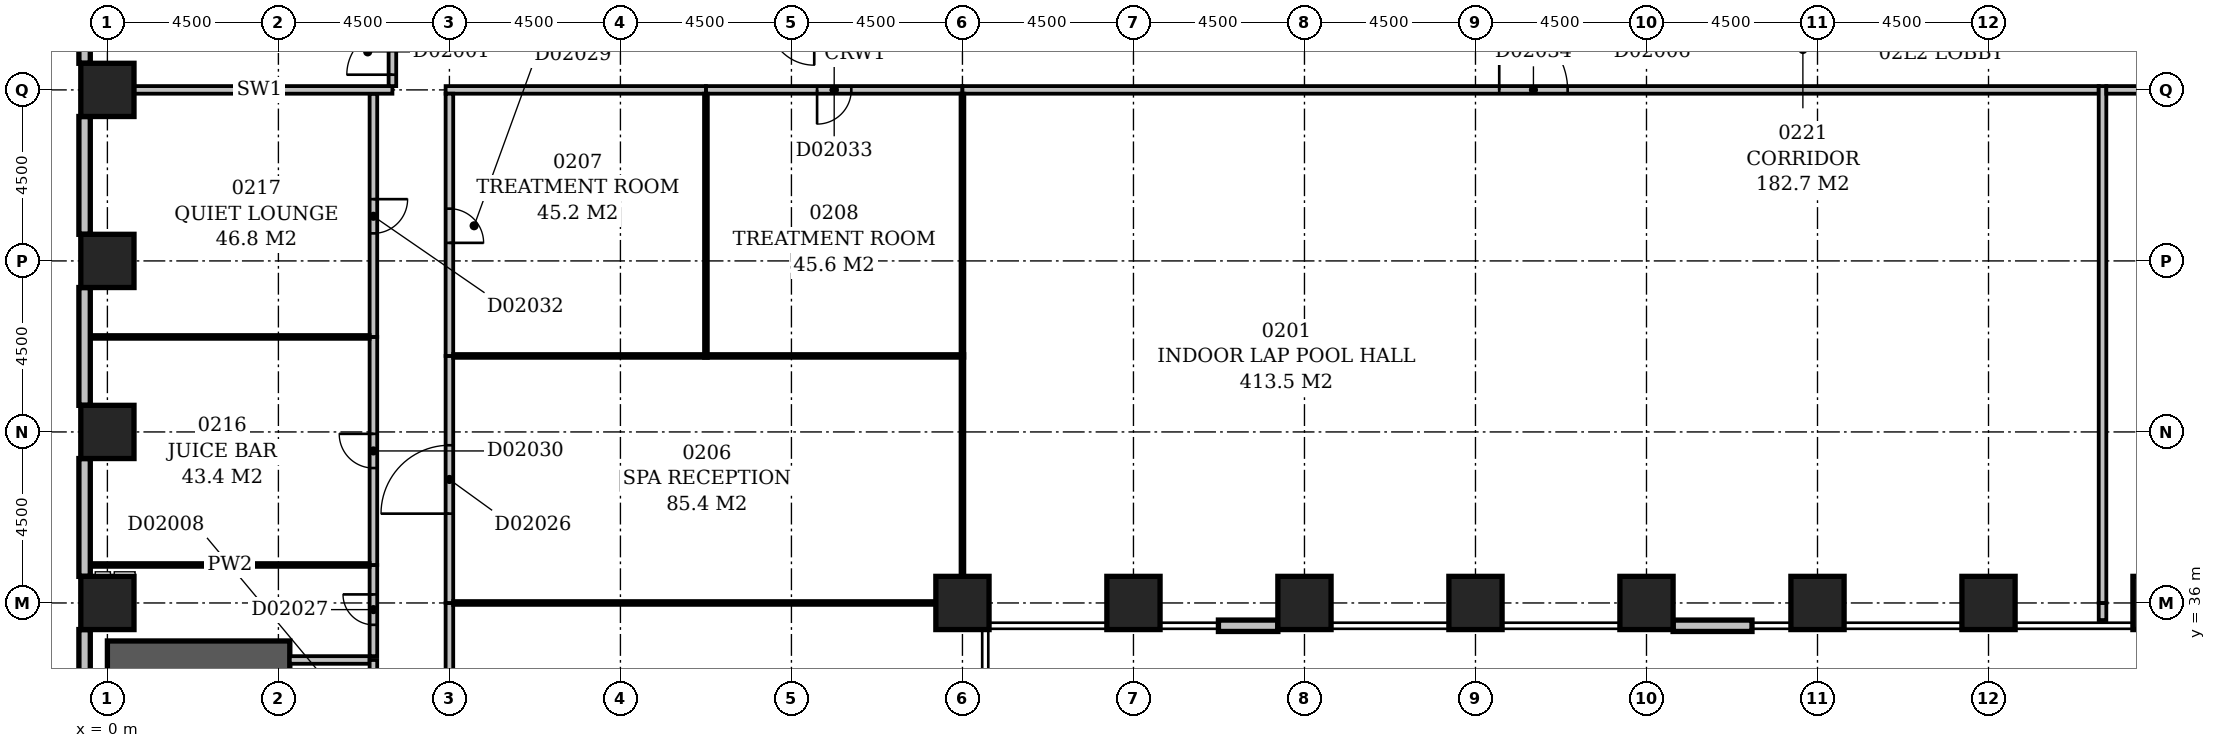
"""IFC4 building model, lengths in metres.
Left out: names, types, materials, properties, quantities, classifications, styles, units other than length and angle.
Written with IfcOpenShell. Run it as: python <this file> out.ifc"""

import sys

from ifc_helpers import new_model, si_unit, direction, frame, frame_2d, origin, origin_2d, place, context, subcontext, project, spatial, rectangle, extrude, element, fill, save


model = new_model("IFC4")
c1 = context("Model", 3, precision=1e-05, world=origin(), true_north=direction((0.0, 1.0)))
c2 = subcontext(c1, "Body", "Model", "MODEL_VIEW")
j1 = project(units=[si_unit("LENGTHUNIT", "METRE"), si_unit("PLANEANGLEUNIT", "RADIAN")], contexts=[c1])
p1 = place(None, origin())
s1 = spatial("IfcSite", under=j1, at=p1, CompositionType="ELEMENT")
p2 = place(p1, origin())
s2 = spatial("IfcBuilding", under=s1, at=p2, CompositionType="ELEMENT")
p3 = place(p2, frame((0.0, 0.0, 14.0)))
s3 = spatial("IfcBuildingStorey", under=s2, at=p3, CompositionType="ELEMENT", Elevation=14.0)
p4 = place(p3, frame((0.0, 34.5, -0.4), z_axis=(0.0, 0.0, 1.0), x_axis=(1.0, 0.0, 0.0)))
e1 = element("IfcWall", 1, at=p4, inside=s3, PredefinedType="SHEAR", context=c2, shape_type="SweptSolid", body=[
    extrude(rectangle(XDim=4.8, YDim=1.0, at=frame_2d((2.4, 0.0))), origin(), (0.0, 0.0, 1.0), 5.0),
])
for number, where, z_axis, x_axis in (
    (2, (0.0, 36.0, -0.4), (0.0, 0.0, 1.0), (1.0, 0.0, 0.0)),
    (3, (22.5, 36.0, -0.4), (0.0, 0.0, 1.0), (1.0, 0.0, 0.0)),
    (4, (27.0, 36.0, -0.4), (0.0, 0.0, 1.0), (1.0, 0.0, 0.0)),
    (5, (31.5, 36.0, -0.4), (0.0, 0.0, 1.0), (1.0, 0.0, 0.0)),
    (6, (36.0, 36.0, -0.4), (0.0, 0.0, 1.0), (1.0, 0.0, 0.0)),
    (7, (40.5, 36.0, -0.4), (0.0, 0.0, 1.0), (1.0, 0.0, 0.0)),
    (8, (45.0, 36.0, -0.4), (0.0, 0.0, 1.0), (1.0, 0.0, 0.0)),
    (9, (49.5, 36.0, -0.4), (0.0, 0.0, 1.0), (1.0, 0.0, 0.0)),
    (10, (54.0, 36.0, -0.4), (0.0, 0.0, 1.0), (1.0, 0.0, 0.0)),
    (11, (0.0, 40.5, -0.4), (0.0, 0.0, 1.0), (1.0, 0.0, 0.0)),
    (12, (0.0, 45.0, -0.4), (0.0, 0.0, 1.0), (1.0, 0.0, 0.0)),
    (13, (0.0, 49.5, -0.4), (0.0, 0.0, 1.0), (1.0, 0.0, 0.0)),
):
    element("IfcColumn", number, at=place(p3, frame(where, z_axis=z_axis, x_axis=x_axis)), inside=s3, PredefinedType="COLUMN", context=c2, shape_type="SweptSolid", body=[
        extrude(rectangle(XDim=1.4, YDim=1.4, at=origin_2d()), origin(), (0.0, 0.0, 1.0), 5.0),
    ])
p5 = place(p3, frame((29.236, 35.4, 0.0), z_axis=(0.0, 0.0, 1.0), x_axis=(1.0, 0.0, 0.0)))
e14 = element("IfcWall", 14, at=p5, inside=s3, PredefinedType="STANDARD", context=c2, shape_type="SweptSolid", body=[
    extrude(rectangle(XDim=1.564, YDim=0.3, at=frame_2d((0.782, 0.0))), origin(), (0.0, 0.0, 1.0), 3.9),
])
p6 = place(p3, frame((41.2, 35.4, 0.0), z_axis=(0.0, 0.0, 1.0), x_axis=(1.0, 0.0, 0.0)))
e15 = element("IfcWall", 15, at=p6, inside=s3, PredefinedType="STANDARD", context=c2, shape_type="SweptSolid", body=[
    extrude(rectangle(XDim=2.076, YDim=0.3, at=frame_2d((1.038, 0.0))), origin(), (0.0, 0.0, 1.0), 3.9),
])
for number, where, z_axis, x_axis in (
    (16, (-0.6, 53.3, 0.0), (0.0, 0.0, 1.0), (0.0, -1.0, 0.0)),
    (17, (-0.6, 48.8, 0.0), (0.0, 0.0, 1.0), (0.0, -1.0, 0.0)),
    (18, (-0.6, 44.3, 0.0), (0.0, 0.0, 1.0), (0.0, -1.0, 0.0)),
    (19, (-0.6, 39.8, 0.0), (0.0, 0.0, 1.0), (0.0, -1.0, 0.0)),
    (20, (-0.6, 35.3, 0.0), (0.0, 0.0, 1.0), (0.0, -1.0, 0.0)),
):
    element("IfcWall", number, at=place(p3, frame(where, z_axis=z_axis, x_axis=x_axis)), inside=s3, PredefinedType="STANDARD", context=c2, shape_type="SweptSolid", body=[
        extrude(rectangle(XDim=3.1, YDim=0.3, at=frame_2d((1.55, 0.0))), origin(), (0.0, 0.0, 1.0), 3.9),
    ])
p7 = place(p3, frame((7.0, 32.1, 0.0), z_axis=(0.0, 0.0, 1.0), x_axis=(0.0, 1.0, 0.0)))
e21 = element("IfcWall", 21, at=p7, inside=s3, PredefinedType="PARTITIONING", context=c2, shape_type="SweptSolid", body=[
    extrude(rectangle(XDim=2.4, YDim=0.2, at=frame_2d((1.2, 0.0))), origin(), (0.0, 0.0, 1.0), 4.6),
])
p8 = place(p7, frame((0.55, 0.0, 0.0)))
e22 = element("IfcOpeningElement", 22, at=p8, cuts=e21, PredefinedType="OPENING", context=c2, shape_type="SweptSolid", body=[
    extrude(rectangle(XDim=1.2, YDim=2.1, at=frame_2d((0.6, 1.05))), frame((0.0, 0.112, 0.0), z_axis=(0.0, -1.0, 0.0), x_axis=(1.0, 0.0, 0.0)), (0.0, 0.0, 1.0), 0.224),
])
p9 = place(p3, frame((4.8, 34.5, 0.0), z_axis=(0.0, 0.0, 1.0), x_axis=(1.0, 0.0, 0.0)))
e23 = element("IfcWall", 23, at=p9, inside=s3, PredefinedType="PARTITIONING", context=c2, shape_type="SweptSolid", body=[
    extrude(rectangle(XDim=2.1, YDim=0.2, at=frame_2d((1.05, 0.0))), origin(), (0.0, 0.0, 1.0), 4.6),
])
p10 = place(p3, frame((0.5, 49.5, 0.0), z_axis=(0.0, 0.0, 1.0), x_axis=(1.0, 0.0, 0.0)))
e24 = element("IfcWall", 24, at=p10, inside=s3, PredefinedType="PARTITIONING", context=c2, shape_type="SweptSolid", body=[
    extrude(rectangle(XDim=7.0, YDim=0.2, at=frame_2d((3.5, 0.0))), origin(), (0.0, 0.0, 1.0), 4.6),
])
p11 = place(p3, frame((7.5, 49.6, 0.0), z_axis=(0.0, 0.0, 1.0), x_axis=(0.0, 1.0, 0.0)))
e25 = element("IfcWall", 25, at=p11, inside=s3, PredefinedType="PARTITIONING", context=c2, shape_type="SweptSolid", body=[
    extrude(rectangle(XDim=3.9, YDim=0.2, at=frame_2d((1.95, 0.0))), origin(), (0.0, 0.0, 1.0), 4.6),
])
p12 = place(p11, frame((0.3, 0.0, 0.0)))
e26 = element("IfcOpeningElement", 26, at=p12, cuts=e25, PredefinedType="OPENING", context=c2, shape_type="SweptSolid", body=[
    extrude(rectangle(XDim=1.2, YDim=2.1, at=frame_2d((0.6, 1.05))), frame((0.0, 0.112, 0.0), z_axis=(0.0, -1.0, 0.0), x_axis=(1.0, 0.0, 0.0)), (0.0, 0.0, 1.0), 0.224),
])
p13 = place(p3, frame((9.0, 27.0, 0.0), z_axis=(0.0, 0.0, 1.0), x_axis=(0.0, 1.0, 0.0)))
e27 = element("IfcWall", 27, at=p13, inside=s3, PredefinedType="PARTITIONING", context=c2, shape_type="SweptSolid", body=[
    extrude(rectangle(XDim=9.0, YDim=0.2, at=frame_2d((4.5, 0.0))), origin(), (0.0, 0.0, 1.0), 4.6),
])
p14 = place(p13, frame((4.05, 0.0, 0.0)))
e28 = element("IfcOpeningElement", 28, at=p14, cuts=e27, PredefinedType="OPENING", context=c2, shape_type="SweptSolid", body=[
    extrude(rectangle(XDim=0.9, YDim=2.1, at=frame_2d((0.45, 1.05))), frame((0.0, 0.112, 0.0), z_axis=(0.0, -1.0, 0.0), x_axis=(1.0, 0.0, 0.0)), (0.0, 0.0, 1.0), 0.224),
])
p15 = place(p3, frame((22.5, 35.35, 0.0), z_axis=(0.0, 0.0, 1.0), x_axis=(0.0, 1.0, 0.0)))
e29 = element("IfcWall", 29, at=p15, inside=s3, PredefinedType="PARTITIONING", context=c2, shape_type="SweptSolid", body=[
    extrude(rectangle(XDim=0.6, YDim=0.1, at=frame_2d((0.3, 0.0))), origin(), (0.0, 0.0, 1.0), 3.9),
])
p16 = place(p3, frame((9.0, 36.0, 0.0), z_axis=(0.0, 0.0, 1.0), x_axis=(0.0, 1.0, 0.0)))
e30 = element("IfcWall", 30, at=p16, inside=s3, PredefinedType="PARTITIONING", context=c2, shape_type="SweptSolid", body=[
    extrude(rectangle(XDim=6.5, YDim=0.2, at=frame_2d((3.25, 0.0))), origin(), (0.0, 0.0, 1.0), 4.6),
])
p17 = place(p16, frame((2.35, 0.0, 0.0)))
e31 = element("IfcOpeningElement", 31, at=p17, cuts=e30, PredefinedType="OPENING", context=c2, shape_type="SweptSolid", body=[
    extrude(rectangle(XDim=1.8, YDim=2.4, at=frame_2d((0.9, 1.2))), frame((0.0, 0.112, 0.0), z_axis=(0.0, -1.0, 0.0), x_axis=(1.0, 0.0, 0.0)), (0.0, 0.0, 1.0), 0.224),
])
p18 = place(p3, frame((22.55, 36.0, 0.0), z_axis=(0.0, 0.0, 1.0), x_axis=(-1.0, 0.0, 0.0)))
e32 = element("IfcWall", 32, at=p18, inside=s3, PredefinedType="PARTITIONING", context=c2, shape_type="SweptSolid", body=[
    extrude(rectangle(XDim=13.45, YDim=0.1, at=frame_2d((6.725, 0.0))), origin(), (0.0, 0.0, 1.0), 3.7),
])
p19 = place(p3, frame((22.5, 36.05, 0.0), z_axis=(0.0, 0.0, 1.0), x_axis=(0.0, 1.0, 0.0)))
e33 = element("IfcWall", 33, at=p19, inside=s3, PredefinedType="PARTITIONING", context=c2, shape_type="SweptSolid", body=[
    extrude(rectangle(XDim=6.4, YDim=0.1, at=frame_2d((3.2, 0.0))), origin(), (0.0, 0.0, 1.0), 4.6),
])
p20 = place(p3, frame((52.5, 36.0, 0.0), z_axis=(0.0, 0.0, 1.0), x_axis=(0.0, -1.0, 0.0)))
e34 = element("IfcWall", 34, at=p20, inside=s3, PredefinedType="PARTITIONING", context=c2, shape_type="SweptSolid", body=[
    extrude(rectangle(XDim=0.45, YDim=0.2, at=frame_2d((0.225, 0.0))), origin(), (0.0, 0.0, 1.0), 4.6),
])
p21 = place(p3, frame((-0.45, 37.0, 0.0), z_axis=(0.0, 0.0, 1.0), x_axis=(1.0, 0.0, 0.0)))
e35 = element("IfcWall", 35, at=p21, inside=s3, PredefinedType="PARTITIONING", context=c2, shape_type="SweptSolid", body=[
    extrude(rectangle(XDim=7.35, YDim=0.1, at=frame_2d((3.675, 0.0))), origin(), (0.0, 0.0, 1.0), 4.6),
])
p22 = place(p3, frame((7.0, 37.0, 0.0), z_axis=(0.0, 0.0, 1.0), x_axis=(0.0, -1.0, 0.0)))
e36 = element("IfcWall", 36, at=p22, inside=s3, PredefinedType="PARTITIONING", context=c2, shape_type="SweptSolid", body=[
    extrude(rectangle(XDim=2.4, YDim=0.2, at=frame_2d((1.2, 0.0))), origin(), (0.0, 0.0, 1.0), 4.6),
])
p23 = place(p22, frame((0.775, 0.0, 0.0)))
e37 = element("IfcOpeningElement", 37, at=p23, cuts=e36, PredefinedType="OPENING", context=c2, shape_type="SweptSolid", body=[
    extrude(rectangle(XDim=0.8, YDim=2.1, at=frame_2d((0.4, 1.05))), frame((0.0, 0.112, 0.0), z_axis=(0.0, -1.0, 0.0), x_axis=(1.0, 0.0, 0.0)), (0.0, 0.0, 1.0), 0.224),
])
p24 = place(p3, frame((9.1, 42.5, 0.0), z_axis=(0.0, 0.0, 1.0), x_axis=(1.0, 0.0, 0.0)))
e38 = element("IfcWall", 38, at=p24, inside=s3, PredefinedType="PARTITIONING", context=c2, shape_type="SweptSolid", body=[
    extrude(rectangle(XDim=6.6, YDim=0.1, at=frame_2d((3.3, 0.0))), origin(), (0.0, 0.0, 1.0), 4.6),
])
p25 = place(p3, frame((9.0, 42.5, 0.0), z_axis=(0.0, 0.0, 1.0), x_axis=(0.0, 1.0, 0.0)))
e39 = element("IfcWall", 39, at=p25, inside=s3, PredefinedType="PARTITIONING", context=c2, shape_type="SweptSolid", body=[
    extrude(rectangle(XDim=6.9, YDim=0.2, at=frame_2d((3.45, 0.0))), origin(), (0.0, 0.0, 1.0), 4.6),
])
p26 = place(p25, frame((2.975, 0.0, 0.0)))
e40 = element("IfcOpeningElement", 40, at=p26, cuts=e39, PredefinedType="OPENING", context=c2, shape_type="SweptSolid", body=[
    extrude(rectangle(XDim=0.9, YDim=2.1, at=frame_2d((0.45, 1.05))), frame((0.0, 0.112, 0.0), z_axis=(0.0, -1.0, 0.0), x_axis=(1.0, 0.0, 0.0)), (0.0, 0.0, 1.0), 0.224),
])
p27 = place(p3, frame((15.8, 42.5, 0.0), z_axis=(0.0, 0.0, 1.0), x_axis=(1.0, 0.0, 0.0)))
e41 = element("IfcWall", 41, at=p27, inside=s3, PredefinedType="PARTITIONING", context=c2, shape_type="SweptSolid", body=[
    extrude(rectangle(XDim=6.75, YDim=0.1, at=frame_2d((3.375, 0.0))), origin(), (0.0, 0.0, 1.0), 4.6),
])
p28 = place(p3, frame((22.5, 42.55, 0.0), z_axis=(0.0, 0.0, 1.0), x_axis=(0.0, 1.0, 0.0)))
e42 = element("IfcWall", 42, at=p28, inside=s3, PredefinedType="PARTITIONING", context=c2, shape_type="SweptSolid", body=[
    extrude(rectangle(XDim=6.85, YDim=0.1, at=frame_2d((3.425, 0.0))), origin(), (0.0, 0.0, 1.0), 4.6),
])
p29 = place(p3, frame((-0.45, 43.0, 0.0), z_axis=(0.0, 0.0, 1.0), x_axis=(1.0, 0.0, 0.0)))
e43 = element("IfcWall", 43, at=p29, inside=s3, PredefinedType="PARTITIONING", context=c2, shape_type="SweptSolid", body=[
    extrude(rectangle(XDim=7.35, YDim=0.1, at=frame_2d((3.675, 0.0))), origin(), (0.0, 0.0, 1.0), 4.6),
])
p30 = place(p3, frame((7.0, 43.0, 0.0), z_axis=(0.0, 0.0, 1.0), x_axis=(0.0, -1.0, 0.0)))
e44 = element("IfcWall", 44, at=p30, inside=s3, PredefinedType="PARTITIONING", context=c2, shape_type="SweptSolid", body=[
    extrude(rectangle(XDim=6.0, YDim=0.2, at=frame_2d((3.0, 0.0))), origin(), (0.0, 0.0, 1.0), 4.6),
])
p31 = place(p30, frame((2.55, 0.0, 0.0)))
e45 = element("IfcOpeningElement", 45, at=p31, cuts=e44, PredefinedType="OPENING", context=c2, shape_type="SweptSolid", body=[
    extrude(rectangle(XDim=0.9, YDim=2.1, at=frame_2d((0.45, 1.05))), frame((0.0, 0.112, 0.0), z_axis=(0.0, -1.0, 0.0), x_axis=(1.0, 0.0, 0.0)), (0.0, 0.0, 1.0), 0.224),
])
p32 = place(p3, frame((7.0, 49.4, 0.0), z_axis=(0.0, 0.0, 1.0), x_axis=(0.0, -1.0, 0.0)))
e46 = element("IfcWall", 46, at=p32, inside=s3, PredefinedType="PARTITIONING", context=c2, shape_type="SweptSolid", body=[
    extrude(rectangle(XDim=6.4, YDim=0.2, at=frame_2d((3.2, 0.0))), origin(), (0.0, 0.0, 1.0), 4.6),
])
p33 = place(p32, frame((2.775, 0.0, 0.0)))
e47 = element("IfcOpeningElement", 47, at=p33, cuts=e46, PredefinedType="OPENING", context=c2, shape_type="SweptSolid", body=[
    extrude(rectangle(XDim=0.9, YDim=2.1, at=frame_2d((0.45, 1.05))), frame((0.0, 0.112, 0.0), z_axis=(0.0, -1.0, 0.0), x_axis=(1.0, 0.0, 0.0)), (0.0, 0.0, 1.0), 0.224),
])
p34 = place(p3, frame((8.9, 49.5, 0.0), z_axis=(0.0, 0.0, 1.0), x_axis=(1.0, 0.0, 0.0)))
e48 = element("IfcWall", 48, at=p34, inside=s3, PredefinedType="PARTITIONING", context=c2, shape_type="SweptSolid", body=[
    extrude(rectangle(XDim=6.85, YDim=0.2, at=frame_2d((3.425, 0.0))), origin(), (0.0, 0.0, 1.0), 4.6),
])
p35 = place(p3, frame((15.75, 49.4, 0.0), z_axis=(0.0, 0.0, 1.0), x_axis=(0.0, -1.0, 0.0)))
e49 = element("IfcWall", 49, at=p35, inside=s3, PredefinedType="PARTITIONING", context=c2, shape_type="SweptSolid", body=[
    extrude(rectangle(XDim=6.95, YDim=0.1, at=frame_2d((3.475, 0.0))), origin(), (0.0, 0.0, 1.0), 4.6),
])
p36 = place(p3, frame((15.75, 49.5, 0.0), z_axis=(0.0, 0.0, 1.0), x_axis=(1.0, 0.0, 0.0)))
e50 = element("IfcWall", 50, at=p36, inside=s3, PredefinedType="PARTITIONING", context=c2, shape_type="SweptSolid", body=[
    extrude(rectangle(XDim=6.75, YDim=0.2, at=frame_2d((3.375, 0.0))), origin(), (0.0, 0.0, 1.0), 4.6),
])
p37 = place(p36, frame((2.925, 0.0, 0.0)))
e51 = element("IfcOpeningElement", 51, at=p37, cuts=e50, PredefinedType="OPENING", context=c2, shape_type="SweptSolid", body=[
    extrude(rectangle(XDim=0.9, YDim=2.1, at=frame_2d((0.45, 1.05))), frame((0.0, 0.112, 0.0), z_axis=(0.0, -1.0, 0.0), x_axis=(1.0, 0.0, 0.0)), (0.0, 0.0, 1.0), 0.224),
])
p38 = place(p3, frame((22.5, 49.5, 0.0), z_axis=(0.0, 0.0, 1.0), x_axis=(1.0, 0.0, 0.0)))
e52 = element("IfcWall", 52, at=p38, inside=s3, PredefinedType="PARTITIONING", context=c2, shape_type="SweptSolid", body=[
    extrude(rectangle(XDim=29.9, YDim=0.2, at=frame_2d((14.95, 0.0))), origin(), (0.0, 0.0, 1.0), 4.6),
])
p39 = place(p38, frame((14.125, 0.0, 0.0)))
e53 = element("IfcOpeningElement", 53, at=p39, cuts=e52, PredefinedType="OPENING", context=c2, shape_type="SweptSolid", body=[
    extrude(rectangle(XDim=1.8, YDim=2.4, at=frame_2d((0.9, 1.2))), frame((0.0, 0.112, 0.0), z_axis=(0.0, -1.0, 0.0), x_axis=(1.0, 0.0, 0.0)), (0.0, 0.0, 1.0), 0.224),
])
p40 = place(p3, frame((52.5, 49.6, 0.0), z_axis=(0.0, 0.0, 1.0), x_axis=(0.0, -1.0, 0.0)))
e54 = element("IfcWall", 54, at=p40, inside=s3, PredefinedType="PARTITIONING", context=c2, shape_type="SweptSolid", body=[
    extrude(rectangle(XDim=13.6, YDim=0.2, at=frame_2d((6.8, 0.0))), origin(), (0.0, 0.0, 1.0), 4.6),
])
p41 = place(p3, frame((52.6, 49.5, 0.0), z_axis=(0.0, 0.0, 1.0), x_axis=(1.0, 0.0, 0.0)))
e55 = element("IfcWall", 55, at=p41, inside=s3, PredefinedType="PARTITIONING", context=c2, shape_type="SweptSolid", body=[
    extrude(rectangle(XDim=7.3, YDim=0.2, at=frame_2d((3.65, 0.0))), origin(), (0.0, 0.0, 1.0), 4.6),
])
p42 = place(p41, frame((3.05, 0.0, 0.0)))
e56 = element("IfcOpeningElement", 56, at=p42, cuts=e55, PredefinedType="OPENING", context=c2, shape_type="SweptSolid", body=[
    extrude(rectangle(XDim=1.2, YDim=2.1, at=frame_2d((0.6, 1.05))), frame((0.0, 0.112, 0.0), z_axis=(0.0, -1.0, 0.0), x_axis=(1.0, 0.0, 0.0)), (0.0, 0.0, 1.0), 0.224),
])
p43 = place(p12, origin())
e57 = element("IfcDoor", 57, at=p43, inside=s3, OperationType="SINGLE_SWING_LEFT", PredefinedType="DOOR", context=c2, shape_type="SweptSolid", body=[
    extrude(rectangle(XDim=1.2, YDim=2.1, at=frame_2d((0.6, 1.05))), frame((0.0, 0.025, 0.0), z_axis=(0.0, -1.0, 0.0), x_axis=(1.0, 0.0, 0.0)), (0.0, 0.0, 1.0), 0.05),
])
fill(e26, e57)
p44 = place(p17, origin())
e58 = element("IfcDoor", 58, at=p44, inside=s3, OperationType="DOUBLE_DOOR_SINGLE_SWING", PredefinedType="DOOR", context=c2, shape_type="SweptSolid", body=[
    extrude(rectangle(XDim=1.8, YDim=2.4, at=frame_2d((0.9, 1.2))), frame((0.0, 0.025, 0.0), z_axis=(0.0, -1.0, 0.0), x_axis=(1.0, 0.0, 0.0)), (0.0, 0.0, 1.0), 0.05),
])
fill(e31, e58)
p45 = place(p23, frame((0.8, 0.0, 0.0), z_axis=(0.0, 0.0, 1.0), x_axis=(-1.0, 0.0, 0.0)))
e59 = element("IfcDoor", 59, at=p45, inside=s3, OperationType="SINGLE_SWING_RIGHT", PredefinedType="DOOR", context=c2, shape_type="SweptSolid", body=[
    extrude(rectangle(XDim=0.8, YDim=2.1, at=frame_2d((0.4, 1.05))), frame((0.0, 0.025, 0.0), z_axis=(0.0, -1.0, 0.0), x_axis=(1.0, 0.0, 0.0)), (0.0, 0.0, 1.0), 0.05),
])
fill(e37, e59)
p46 = place(p26, frame((0.9, 0.0, 0.0), z_axis=(0.0, 0.0, 1.0), x_axis=(-1.0, 0.0, 0.0)))
e60 = element("IfcDoor", 60, at=p46, inside=s3, OperationType="SINGLE_SWING_RIGHT", PredefinedType="DOOR", context=c2, shape_type="SweptSolid", body=[
    extrude(rectangle(XDim=0.9, YDim=2.1, at=frame_2d((0.45, 1.05))), frame((0.0, 0.025, 0.0), z_axis=(0.0, -1.0, 0.0), x_axis=(1.0, 0.0, 0.0)), (0.0, 0.0, 1.0), 0.05),
])
fill(e40, e60)
p47 = place(p31, frame((0.9, 0.0, 0.0), z_axis=(0.0, 0.0, 1.0), x_axis=(-1.0, 0.0, 0.0)))
e61 = element("IfcDoor", 61, at=p47, inside=s3, OperationType="SINGLE_SWING_RIGHT", PredefinedType="DOOR", context=c2, shape_type="SweptSolid", body=[
    extrude(rectangle(XDim=0.9, YDim=2.1, at=frame_2d((0.45, 1.05))), frame((0.0, 0.025, 0.0), z_axis=(0.0, -1.0, 0.0), x_axis=(1.0, 0.0, 0.0)), (0.0, 0.0, 1.0), 0.05),
])
fill(e45, e61)
p48 = place(p33, origin())
e62 = element("IfcDoor", 62, at=p48, inside=s3, OperationType="SINGLE_SWING_LEFT", PredefinedType="DOOR", context=c2, shape_type="SweptSolid", body=[
    extrude(rectangle(XDim=0.9, YDim=2.1, at=frame_2d((0.45, 1.05))), frame((0.0, 0.025, 0.0), z_axis=(0.0, -1.0, 0.0), x_axis=(1.0, 0.0, 0.0)), (0.0, 0.0, 1.0), 0.05),
])
fill(e47, e62)
p49 = place(p37, frame((0.9, 0.0, 0.0), z_axis=(0.0, 0.0, 1.0), x_axis=(-1.0, 0.0, 0.0)))
e63 = element("IfcDoor", 63, at=p49, inside=s3, OperationType="SINGLE_SWING_RIGHT", PredefinedType="DOOR", context=c2, shape_type="SweptSolid", body=[
    extrude(rectangle(XDim=0.9, YDim=2.1, at=frame_2d((0.45, 1.05))), frame((0.0, 0.025, 0.0), z_axis=(0.0, -1.0, 0.0), x_axis=(1.0, 0.0, 0.0)), (0.0, 0.0, 1.0), 0.05),
])
fill(e51, e63)
p50 = place(p39, origin())
e64 = element("IfcDoor", 64, at=p50, inside=s3, OperationType="DOUBLE_DOOR_SINGLE_SWING", PredefinedType="DOOR", context=c2, shape_type="SweptSolid", body=[
    extrude(rectangle(XDim=1.8, YDim=2.4, at=frame_2d((0.9, 1.2))), frame((0.0, 0.025, 0.0), z_axis=(0.0, -1.0, 0.0), x_axis=(1.0, 0.0, 0.0)), (0.0, 0.0, 1.0), 0.05),
])
fill(e53, e64)
save(model, sys.argv[1])
